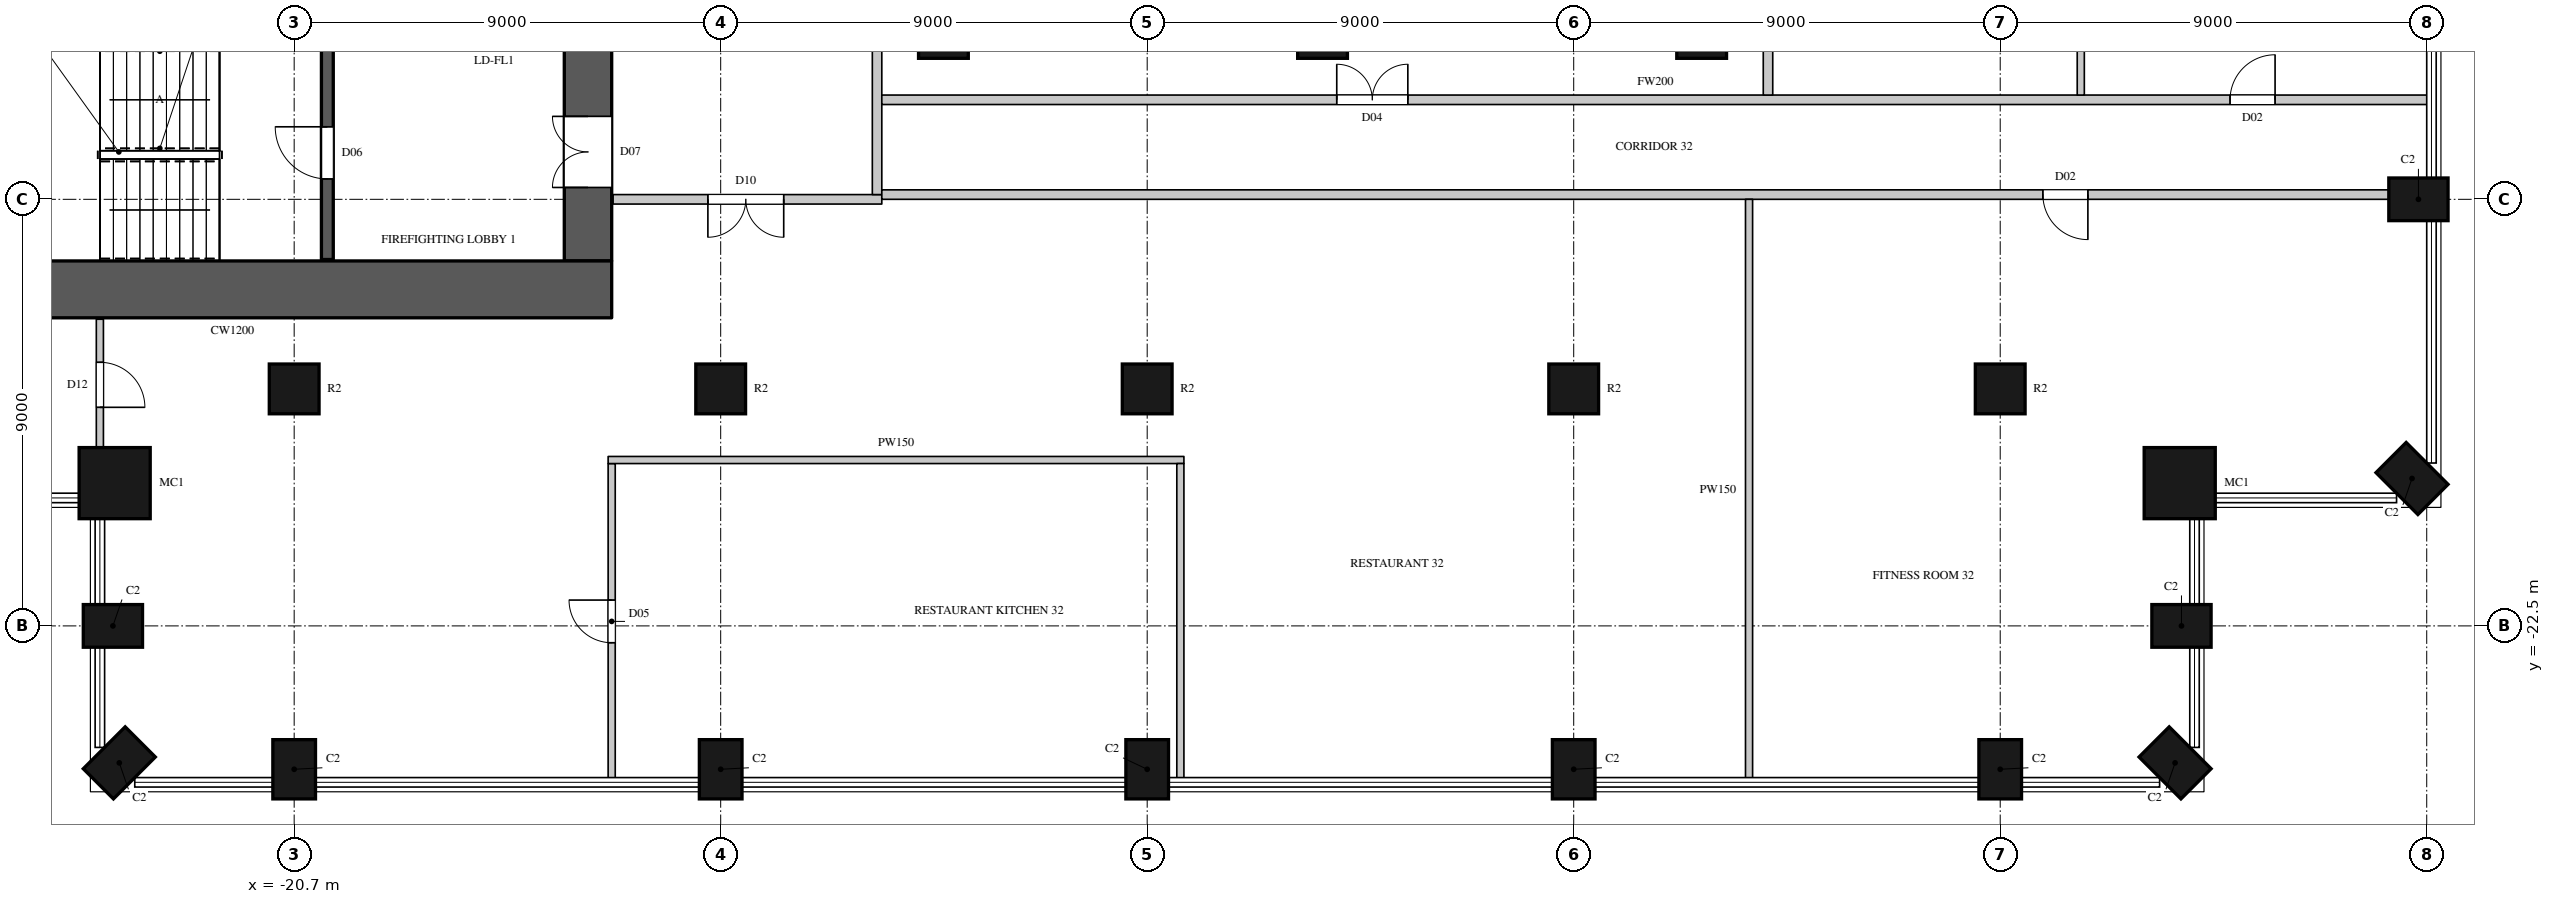
"""IFC4 building model, lengths in metres.
Left out: names, types, materials, properties, quantities, classifications, styles, units other than length and angle.
Written with IfcOpenShell. Run it as: python <this file> out.ifc"""

import sys

from ifc_helpers import new_model, si_unit, direction, frame, frame_2d, origin, origin_2d, place, context, subcontext, project, spatial, rectangle, circle, extrude, element, fill, save


model = new_model("IFC4")
c1 = context("Model", 3, precision=1e-05, world=origin(), true_north=direction((0.0, 1.0)))
c2 = subcontext(c1, "Body", "Model", "MODEL_VIEW")
j1 = project(units=[si_unit("LENGTHUNIT", "METRE"), si_unit("PLANEANGLEUNIT", "RADIAN")], contexts=[c1])
p1 = place(None, origin())
s1 = spatial("IfcSite", under=j1, at=p1, CompositionType="ELEMENT")
p2 = place(p1, origin())
s2 = spatial("IfcBuilding", under=s1, at=p2, CompositionType="ELEMENT")
p3 = place(p2, frame((0.0, 0.0, 145.5)))
s3 = spatial("IfcBuildingStorey", under=s2, at=p3, CompositionType="ELEMENT", Elevation=145.5)
p4 = place(p3, frame((-24.488, -19.488, 0.0), z_axis=(0.0, 0.0, 1.0), x_axis=(1.0, 0.0, 0.0)))
e1 = element("IfcColumn", 1, at=p4, inside=s3, PredefinedType="COLUMN", context=c2, shape_type="SweptSolid", body=[
    extrude(circle(Radius=0.75, at=origin_2d()), origin(), (0.0, 0.0, 1.0), 7.0),
])
for number, where, z_axis, x_axis in (
    (2, (-24.525, -22.5, 0.0), (0.0, 0.0, 1.0), (0.0, -1.0, 0.0)),
    (3, (-24.39, -25.39, 0.0), (0.0, 0.0, 1.0), (0.707, -0.707, 0.0)),
    (4, (-20.7, -25.525, 0.0), (0.0, 0.0, 1.0), (1.0, 0.0, 0.0)),
    (5, (-11.7, -25.525, 0.0), (0.0, 0.0, 1.0), (1.0, 0.0, 0.0)),
    (6, (-2.7, -25.525, 0.0), (0.0, 0.0, 1.0), (1.0, 0.0, 0.0)),
    (7, (6.3, -25.525, 0.0), (0.0, 0.0, 1.0), (1.0, 0.0, 0.0)),
    (8, (15.3, -25.525, 0.0), (0.0, 0.0, 1.0), (1.0, 0.0, 0.0)),
    (9, (18.99, -25.39, 0.0), (0.0, 0.0, 1.0), (0.707, 0.707, 0.0)),
    (10, (19.125, -22.5, 0.0), (0.0, 0.0, 1.0), (0.0, 1.0, 0.0)),
):
    element("IfcColumn", number, at=place(p3, frame(where, z_axis=z_axis, x_axis=x_axis)), inside=s3, PredefinedType="COLUMN", context=c2, shape_type="SweptSolid", body=[
        extrude(rectangle(XDim=0.9, YDim=1.25, at=origin_2d()), origin(), (0.0, 0.0, 1.0), 7.0),
    ])
p5 = place(p3, frame((19.088, -19.488, 0.0), z_axis=(0.0, 0.0, 1.0), x_axis=(1.0, 0.0, 0.0)))
e11 = element("IfcColumn", 11, at=p5, inside=s3, PredefinedType="COLUMN", context=c2, shape_type="SweptSolid", body=[
    extrude(circle(Radius=0.75, at=origin_2d()), origin(), (0.0, 0.0, 1.0), 7.0),
])
for number, where, z_axis, x_axis in (
    (12, (23.99, -19.39, 0.0), (0.0, 0.0, 1.0), (0.707, 0.707, 0.0)),
    (13, (24.125, -13.5, 0.0), (0.0, 0.0, 1.0), (0.0, 1.0, 0.0)),
):
    element("IfcColumn", number, at=place(p3, frame(where, z_axis=z_axis, x_axis=x_axis)), inside=s3, PredefinedType="COLUMN", context=c2, shape_type="SweptSolid", body=[
        extrude(rectangle(XDim=0.9, YDim=1.25, at=origin_2d()), origin(), (0.0, 0.0, 1.0), 7.0),
    ])
for number, where, z_axis, x_axis in (
    (14, (-20.7, -17.5, 0.0), (0.0, 0.0, 1.0), (1.0, 0.0, 0.0)),
    (15, (-11.7, -17.5, 0.0), (0.0, 0.0, 1.0), (1.0, 0.0, 0.0)),
    (16, (-2.7, -17.5, 0.0), (0.0, 0.0, 1.0), (1.0, 0.0, 0.0)),
    (17, (6.3, -17.5, 0.0), (0.0, 0.0, 1.0), (1.0, 0.0, 0.0)),
    (18, (15.3, -17.5, 0.0), (0.0, 0.0, 1.0), (1.0, 0.0, 0.0)),
    (19, (-7.0, -10.0, 0.0), (0.0, 0.0, 1.0), (1.0, 0.0, 0.0)),
    (20, (1.0, -10.0, 0.0), (0.0, 0.0, 1.0), (1.0, 0.0, 0.0)),
    (21, (9.0, -10.0, 0.0), (0.0, 0.0, 1.0), (1.0, 0.0, 0.0)),
):
    element("IfcColumn", number, at=place(p3, frame(where, z_axis=z_axis, x_axis=x_axis)), inside=s3, PredefinedType="COLUMN", context=c2, shape_type="SweptSolid", body=[
        extrude(circle(Radius=0.525, at=origin_2d()), origin(), (0.0, 0.0, 1.0), 7.0),
    ])
p6 = place(p3, frame((-30.0, -15.4, 0.0), z_axis=(0.0, 0.0, 1.0), x_axis=(1.0, 0.0, 0.0)))
e22 = element("IfcWall", 22, at=p6, inside=s3, PredefinedType="SHEAR", context=c2, shape_type="SweptSolid", body=[
    extrude(rectangle(XDim=16.0, YDim=1.2, at=frame_2d((8.0, 0.0))), origin(), (0.0, 0.0, 1.0), 7.0),
])
p7 = place(p3, frame((-14.5, -14.8, 0.0), z_axis=(0.0, 0.0, 1.0), x_axis=(0.0, 1.0, 0.0)))
e23 = element("IfcWall", 23, at=p7, inside=s3, PredefinedType="SHEAR", context=c2, shape_type="SweptSolid", body=[
    extrude(rectangle(XDim=29.6, YDim=1.0, at=frame_2d((14.8, 0.0))), origin(), (0.0, 0.0, 1.0), 7.0),
])
p8 = place(p7, frame((1.55, 0.0, 0.0)))
e24 = element("IfcOpeningElement", 24, at=p8, cuts=e23, PredefinedType="OPENING", context=c2, shape_type="SweptSolid", body=[
    extrude(rectangle(XDim=1.5, YDim=2.4, at=frame_2d((0.75, 1.2))), frame((0.0, 0.51, 0.0), z_axis=(0.0, -1.0, 0.0), x_axis=(1.0, 0.0, 0.0)), (0.0, 0.0, 1.0), 1.02),
])
p9 = place(p7, frame((26.55, 0.0, 0.0)))
e25 = element("IfcOpeningElement", 25, at=p9, cuts=e23, PredefinedType="OPENING", context=c2, shape_type="SweptSolid", body=[
    extrude(rectangle(XDim=1.5, YDim=2.4, at=frame_2d((0.75, 1.2))), frame((0.0, 0.51, 0.0), z_axis=(0.0, -1.0, 0.0), x_axis=(1.0, 0.0, 0.0)), (0.0, 0.0, 1.0), 1.02),
])
p10 = place(p7, frame((8.45, 0.0, 0.0)))
e26 = element("IfcOpeningElement", 26, at=p10, cuts=e23, PredefinedType="OPENING", context=c2, shape_type="SweptSolid", body=[
    extrude(rectangle(XDim=1.5, YDim=2.4, at=frame_2d((0.75, 1.2))), frame((0.0, 0.51, 0.0), z_axis=(0.0, -1.0, 0.0), x_axis=(1.0, 0.0, 0.0)), (0.0, 0.0, 1.0), 1.02),
])
p11 = place(p7, frame((19.65, 0.0, 0.0)))
e27 = element("IfcOpeningElement", 27, at=p11, cuts=e23, PredefinedType="OPENING", context=c2, shape_type="SweptSolid", body=[
    extrude(rectangle(XDim=1.5, YDim=2.4, at=frame_2d((0.75, 1.2))), frame((0.0, 0.51, 0.0), z_axis=(0.0, -1.0, 0.0), x_axis=(1.0, 0.0, 0.0)), (0.0, 0.0, 1.0), 1.02),
])
p12 = place(p7, frame((14.5, 0.0, 0.0)))
e28 = element("IfcOpeningElement", 28, at=p12, cuts=e23, PredefinedType="OPENING", context=c2, shape_type="SweptSolid", body=[
    extrude(rectangle(XDim=0.6, YDim=2.0, at=frame_2d((0.3, 1.0))), frame((0.0, 0.51, 0.0), z_axis=(0.0, -1.0, 0.0), x_axis=(1.0, 0.0, 0.0)), (0.0, 0.0, 1.0), 1.02),
])
p13 = place(p3, frame((-13.97, -13.5, 0.0), z_axis=(0.0, 0.0, 1.0), x_axis=(1.0, 0.0, 0.0)))
e29 = element("IfcWall", 29, at=p13, inside=s3, PredefinedType="PARTITIONING", context=c2, shape_type="SweptSolid", body=[
    extrude(rectangle(XDim=5.67, YDim=0.2, at=frame_2d((2.835, 0.0))), origin(), (0.0, 0.0, 1.0), 6.7),
])
p14 = place(p13, frame((2.0, 0.0, 0.0)))
e30 = element("IfcOpeningElement", 30, at=p14, cuts=e29, PredefinedType="OPENING", context=c2, shape_type="SweptSolid", body=[
    extrude(rectangle(XDim=1.6, YDim=2.4, at=frame_2d((0.8, 1.2))), frame((0.0, 0.11, 0.0), z_axis=(0.0, -1.0, 0.0), x_axis=(1.0, 0.0, 0.0)), (0.0, 0.0, 1.0), 0.22),
])
p15 = place(p3, frame((-8.4, -13.4, 0.0), z_axis=(0.0, 0.0, 1.0), x_axis=(0.0, 1.0, 0.0)))
e31 = element("IfcWall", 31, at=p15, inside=s3, PredefinedType="PARTITIONING", context=c2, shape_type="SweptSolid", body=[
    extrude(rectangle(XDim=26.8, YDim=0.2, at=frame_2d((13.4, 0.0))), origin(), (0.0, 0.0, 1.0), 6.7),
])
p16 = place(p15, frame((11.5, 0.0, 0.0)))
e32 = element("IfcOpeningElement", 32, at=p16, cuts=e31, PredefinedType="OPENING", context=c2, shape_type="SweptSolid", body=[
    extrude(rectangle(XDim=1.6, YDim=2.4, at=frame_2d((0.8, 1.2))), frame((0.0, 0.11, 0.0), z_axis=(0.0, -1.0, 0.0), x_axis=(1.0, 0.0, 0.0)), (0.0, 0.0, 1.0), 0.22),
])
p17 = place(p3, frame((-8.3, -13.4, 0.0), z_axis=(0.0, 0.0, 1.0), x_axis=(1.0, 0.0, 0.0)))
e33 = element("IfcWall", 33, at=p17, inside=s3, PredefinedType="PARTITIONING", context=c2, shape_type="SweptSolid", body=[
    extrude(rectangle(XDim=31.8, YDim=0.2, at=frame_2d((15.9, 0.0))), origin(), (0.0, 0.0, 1.0), 6.7),
])
p18 = place(p17, frame((24.5, 0.0, 0.0)))
e34 = element("IfcOpeningElement", 34, at=p18, cuts=e33, PredefinedType="OPENING", context=c2, shape_type="SweptSolid", body=[
    extrude(rectangle(XDim=0.95, YDim=2.2, at=frame_2d((0.475, 1.1))), frame((0.0, 0.11, 0.0), z_axis=(0.0, -1.0, 0.0), x_axis=(1.0, 0.0, 0.0)), (0.0, 0.0, 1.0), 0.22),
])
p19 = place(p3, frame((-8.3, -11.4, 0.0), z_axis=(0.0, 0.0, 1.0), x_axis=(1.0, 0.0, 0.0)))
e35 = element("IfcWall", 35, at=p19, inside=s3, PredefinedType="PARTITIONING", context=c2, shape_type="SweptSolid", body=[
    extrude(rectangle(XDim=32.655, YDim=0.2, at=frame_2d((16.328, 0.0))), origin(), (0.0, 0.0, 1.0), 6.7),
])
p20 = place(p19, frame((9.6, 0.0, 0.0)))
e36 = element("IfcOpeningElement", 36, at=p20, cuts=e35, PredefinedType="OPENING", context=c2, shape_type="SweptSolid", body=[
    extrude(rectangle(XDim=1.5, YDim=2.2, at=frame_2d((0.75, 1.1))), frame((0.0, 0.11, 0.0), z_axis=(0.0, -1.0, 0.0), x_axis=(1.0, 0.0, 0.0)), (0.0, 0.0, 1.0), 0.22),
])
p21 = place(p19, frame((28.45, 0.0, 0.0)))
e37 = element("IfcOpeningElement", 37, at=p21, cuts=e35, PredefinedType="OPENING", context=c2, shape_type="SweptSolid", body=[
    extrude(rectangle(XDim=0.95, YDim=2.2, at=frame_2d((0.475, 1.1))), frame((0.0, 0.11, 0.0), z_axis=(0.0, -1.0, 0.0), x_axis=(1.0, 0.0, 0.0)), (0.0, 0.0, 1.0), 0.22),
])
p22 = place(p3, frame((10.4, -11.3, 0.0), z_axis=(0.0, 0.0, 1.0), x_axis=(0.0, 1.0, 0.0)))
e38 = element("IfcWall", 38, at=p22, inside=s3, PredefinedType="PARTITIONING", context=c2, shape_type="SweptSolid", body=[
    extrude(rectangle(XDim=22.6, YDim=0.2, at=frame_2d((11.3, 0.0))), origin(), (0.0, 0.0, 1.0), 6.7),
])
p23 = place(p22, frame((8.9, 0.0, 0.0)))
e39 = element("IfcOpeningElement", 39, at=p23, cuts=e38, PredefinedType="OPENING", context=c2, shape_type="SweptSolid", body=[
    extrude(rectangle(XDim=1.6, YDim=2.4, at=frame_2d((0.8, 1.2))), frame((0.0, 0.11, 0.0), z_axis=(0.0, -1.0, 0.0), x_axis=(1.0, 0.0, 0.0)), (0.0, 0.0, 1.0), 0.22),
])
p24 = place(p22, frame((7.15, 0.0, 0.0)))
e40 = element("IfcOpeningElement", 40, at=p24, cuts=e38, PredefinedType="OPENING", context=c2, shape_type="SweptSolid", body=[
    extrude(rectangle(XDim=1.6, YDim=2.4, at=frame_2d((0.8, 1.2))), frame((0.0, 0.11, 0.0), z_axis=(0.0, -1.0, 0.0), x_axis=(1.0, 0.0, 0.0)), (0.0, 0.0, 1.0), 0.22),
])
p25 = place(p3, frame((-24.8, -18.788, 0.0), z_axis=(0.0, 0.0, 1.0), x_axis=(0.0, 1.0, 0.0)))
e41 = element("IfcWall", 41, at=p25, inside=s3, PredefinedType="PARTITIONING", context=c2, shape_type="SweptSolid", body=[
    extrude(rectangle(XDim=2.758, YDim=0.15, at=frame_2d((1.379, 0.0))), origin(), (0.0, 0.0, 1.0), 6.7),
])
p26 = place(p25, frame((0.9, 0.0, 0.0)))
e42 = element("IfcOpeningElement", 42, at=p26, cuts=e41, PredefinedType="OPENING", context=c2, shape_type="SweptSolid", body=[
    extrude(rectangle(XDim=0.95, YDim=2.2, at=frame_2d((0.475, 1.1))), frame((0.0, 0.085, 0.0), z_axis=(0.0, -1.0, 0.0), x_axis=(1.0, 0.0, 0.0)), (0.0, 0.0, 1.0), 0.17),
])
p27 = place(p3, frame((-14.0, -25.755, 0.0), z_axis=(0.0, 0.0, 1.0), x_axis=(0.0, 1.0, 0.0)))
e43 = element("IfcWall", 43, at=p27, inside=s3, PredefinedType="PARTITIONING", context=c2, shape_type="SweptSolid", body=[
    extrude(rectangle(XDim=6.68, YDim=0.15, at=frame_2d((3.34, 0.0))), origin(), (0.0, 0.0, 1.0), 6.7),
])
p28 = place(p27, frame((2.9, 0.0, 0.0)))
e44 = element("IfcOpeningElement", 44, at=p28, cuts=e43, PredefinedType="OPENING", context=c2, shape_type="SweptSolid", body=[
    extrude(rectangle(XDim=0.9, YDim=2.2, at=frame_2d((0.45, 1.1))), frame((0.0, 0.085, 0.0), z_axis=(0.0, -1.0, 0.0), x_axis=(1.0, 0.0, 0.0)), (0.0, 0.0, 1.0), 0.17),
])
p29 = place(p3, frame((-14.075, -19.0, 0.0), z_axis=(0.0, 0.0, 1.0), x_axis=(1.0, 0.0, 0.0)))
e45 = element("IfcWall", 45, at=p29, inside=s3, PredefinedType="PARTITIONING", context=c2, shape_type="SweptSolid", body=[
    extrude(rectangle(XDim=12.15, YDim=0.15, at=frame_2d((6.075, 0.0))), origin(), (0.0, 0.0, 1.0), 6.7),
])
p30 = place(p3, frame((-2.0, -25.755, 0.0), z_axis=(0.0, 0.0, 1.0), x_axis=(0.0, 1.0, 0.0)))
e46 = element("IfcWall", 46, at=p30, inside=s3, PredefinedType="PARTITIONING", context=c2, shape_type="SweptSolid", body=[
    extrude(rectangle(XDim=6.68, YDim=0.15, at=frame_2d((3.34, 0.0))), origin(), (0.0, 0.0, 1.0), 6.7),
])
p31 = place(p3, frame((10.0, -25.755, 0.0), z_axis=(0.0, 0.0, 1.0), x_axis=(0.0, 1.0, 0.0)))
e47 = element("IfcWall", 47, at=p31, inside=s3, PredefinedType="PARTITIONING", context=c2, shape_type="SweptSolid", body=[
    extrude(rectangle(XDim=12.255, YDim=0.15, at=frame_2d((6.127, 0.0))), origin(), (0.0, 0.0, 1.0), 6.7),
])
p32 = place(p3, frame((17.0, -11.3, 0.0), z_axis=(0.0, 0.0, 1.0), x_axis=(0.0, 1.0, 0.0)))
e48 = element("IfcWall", 48, at=p32, inside=s3, PredefinedType="PARTITIONING", context=c2, shape_type="SweptSolid", body=[
    extrude(rectangle(XDim=6.55, YDim=0.15, at=frame_2d((3.275, 0.0))), origin(), (0.0, 0.0, 1.0), 6.7),
])
p33 = place(p3, frame((-20.0, -14.77, 0.0), z_axis=(0.0, 0.0, 1.0), x_axis=(0.0, 1.0, 0.0)))
e49 = element("IfcWall", 49, at=p33, inside=s3, PredefinedType="SHEAR", context=c2, shape_type="SweptSolid", body=[
    extrude(rectangle(XDim=4.445, YDim=0.25, at=frame_2d((2.223, 0.0))), origin(), (0.0, 0.0, 1.0), 6.7),
])
p34 = place(p33, frame((1.7, 0.0, 0.0)))
e50 = element("IfcOpeningElement", 50, at=p34, cuts=e49, PredefinedType="OPENING", context=c2, shape_type="SweptSolid", body=[
    extrude(rectangle(XDim=1.1, YDim=2.2, at=frame_2d((0.55, 1.1))), frame((0.0, 0.135, 0.0), z_axis=(0.0, -1.0, 0.0), x_axis=(1.0, 0.0, 0.0)), (0.0, 0.0, 1.0), 0.27),
])
p35 = place(p34, origin())
e51 = element("IfcDoor", 51, at=p35, inside=s3, OperationType="SINGLE_SWING_RIGHT", PredefinedType="DOOR", context=c2, shape_type="SweptSolid", body=[
    extrude(rectangle(XDim=1.1, YDim=2.2, at=frame_2d((0.55, 1.1))), frame((0.0, 0.025, 0.0), z_axis=(0.0, -1.0, 0.0), x_axis=(1.0, 0.0, 0.0)), (0.0, 0.0, 1.0), 0.05),
])
fill(e50, e51)
p36 = place(p14, origin())
e52 = element("IfcDoor", 52, at=p36, inside=s3, OperationType="DOUBLE_DOOR_SINGLE_SWING", PredefinedType="DOOR", context=c2, shape_type="SweptSolid", body=[
    extrude(rectangle(XDim=1.6, YDim=2.4, at=frame_2d((0.8, 1.2))), frame((0.0, 0.025, 0.0), z_axis=(0.0, -1.0, 0.0), x_axis=(1.0, 0.0, 0.0)), (0.0, 0.0, 1.0), 0.05),
])
fill(e30, e52)
p37 = place(p28, origin())
e53 = element("IfcDoor", 53, at=p37, inside=s3, OperationType="SINGLE_SWING_RIGHT", PredefinedType="DOOR", context=c2, shape_type="SweptSolid", body=[
    extrude(rectangle(XDim=0.9, YDim=2.2, at=frame_2d((0.45, 1.1))), frame((0.0, 0.025, 0.0), z_axis=(0.0, -1.0, 0.0), x_axis=(1.0, 0.0, 0.0)), (0.0, 0.0, 1.0), 0.05),
])
fill(e44, e53)
p38 = place(p20, origin())
e54 = element("IfcDoor", 54, at=p38, inside=s3, OperationType="DOUBLE_DOOR_SINGLE_SWING", PredefinedType="DOOR", context=c2, shape_type="SweptSolid", body=[
    extrude(rectangle(XDim=1.5, YDim=2.2, at=frame_2d((0.75, 1.1))), frame((0.0, 0.025, 0.0), z_axis=(0.0, -1.0, 0.0), x_axis=(1.0, 0.0, 0.0)), (0.0, 0.0, 1.0), 0.05),
])
fill(e36, e54)
p39 = place(p21, origin())
e55 = element("IfcDoor", 55, at=p39, inside=s3, OperationType="SINGLE_SWING_RIGHT", PredefinedType="DOOR", context=c2, shape_type="SweptSolid", body=[
    extrude(rectangle(XDim=0.95, YDim=2.2, at=frame_2d((0.475, 1.1))), frame((0.0, 0.025, 0.0), z_axis=(0.0, -1.0, 0.0), x_axis=(1.0, 0.0, 0.0)), (0.0, 0.0, 1.0), 0.05),
])
fill(e37, e55)
p40 = place(p18, origin())
e56 = element("IfcDoor", 56, at=p40, inside=s3, OperationType="SINGLE_SWING_LEFT", PredefinedType="DOOR", context=c2, shape_type="SweptSolid", body=[
    extrude(rectangle(XDim=0.95, YDim=2.2, at=frame_2d((0.475, 1.1))), frame((0.0, 0.025, 0.0), z_axis=(0.0, -1.0, 0.0), x_axis=(1.0, 0.0, 0.0)), (0.0, 0.0, 1.0), 0.05),
])
fill(e34, e56)
p41 = place(p26, origin())
e57 = element("IfcDoor", 57, at=p41, inside=s3, OperationType="SINGLE_SWING_RIGHT", PredefinedType="DOOR", context=c2, shape_type="SweptSolid", body=[
    extrude(rectangle(XDim=0.95, YDim=2.2, at=frame_2d((0.475, 1.1))), frame((0.0, 0.025, 0.0), z_axis=(0.0, -1.0, 0.0), x_axis=(1.0, 0.0, 0.0)), (0.0, 0.0, 1.0), 0.05),
])
fill(e42, e57)
p42 = place(p8, origin())
e58 = element("IfcDoor", 58, at=p42, inside=s3, OperationType="DOUBLE_DOOR_SINGLE_SWING", PredefinedType="DOOR", context=c2, shape_type="SweptSolid", body=[
    extrude(rectangle(XDim=1.5, YDim=2.4, at=frame_2d((0.75, 1.2))), frame((0.0, 0.495, 0.0), z_axis=(0.0, -1.0, 0.0), x_axis=(1.0, 0.0, 0.0)), (0.0, 0.0, 1.0), 0.05),
])
fill(e24, e58)
save(model, sys.argv[1])
